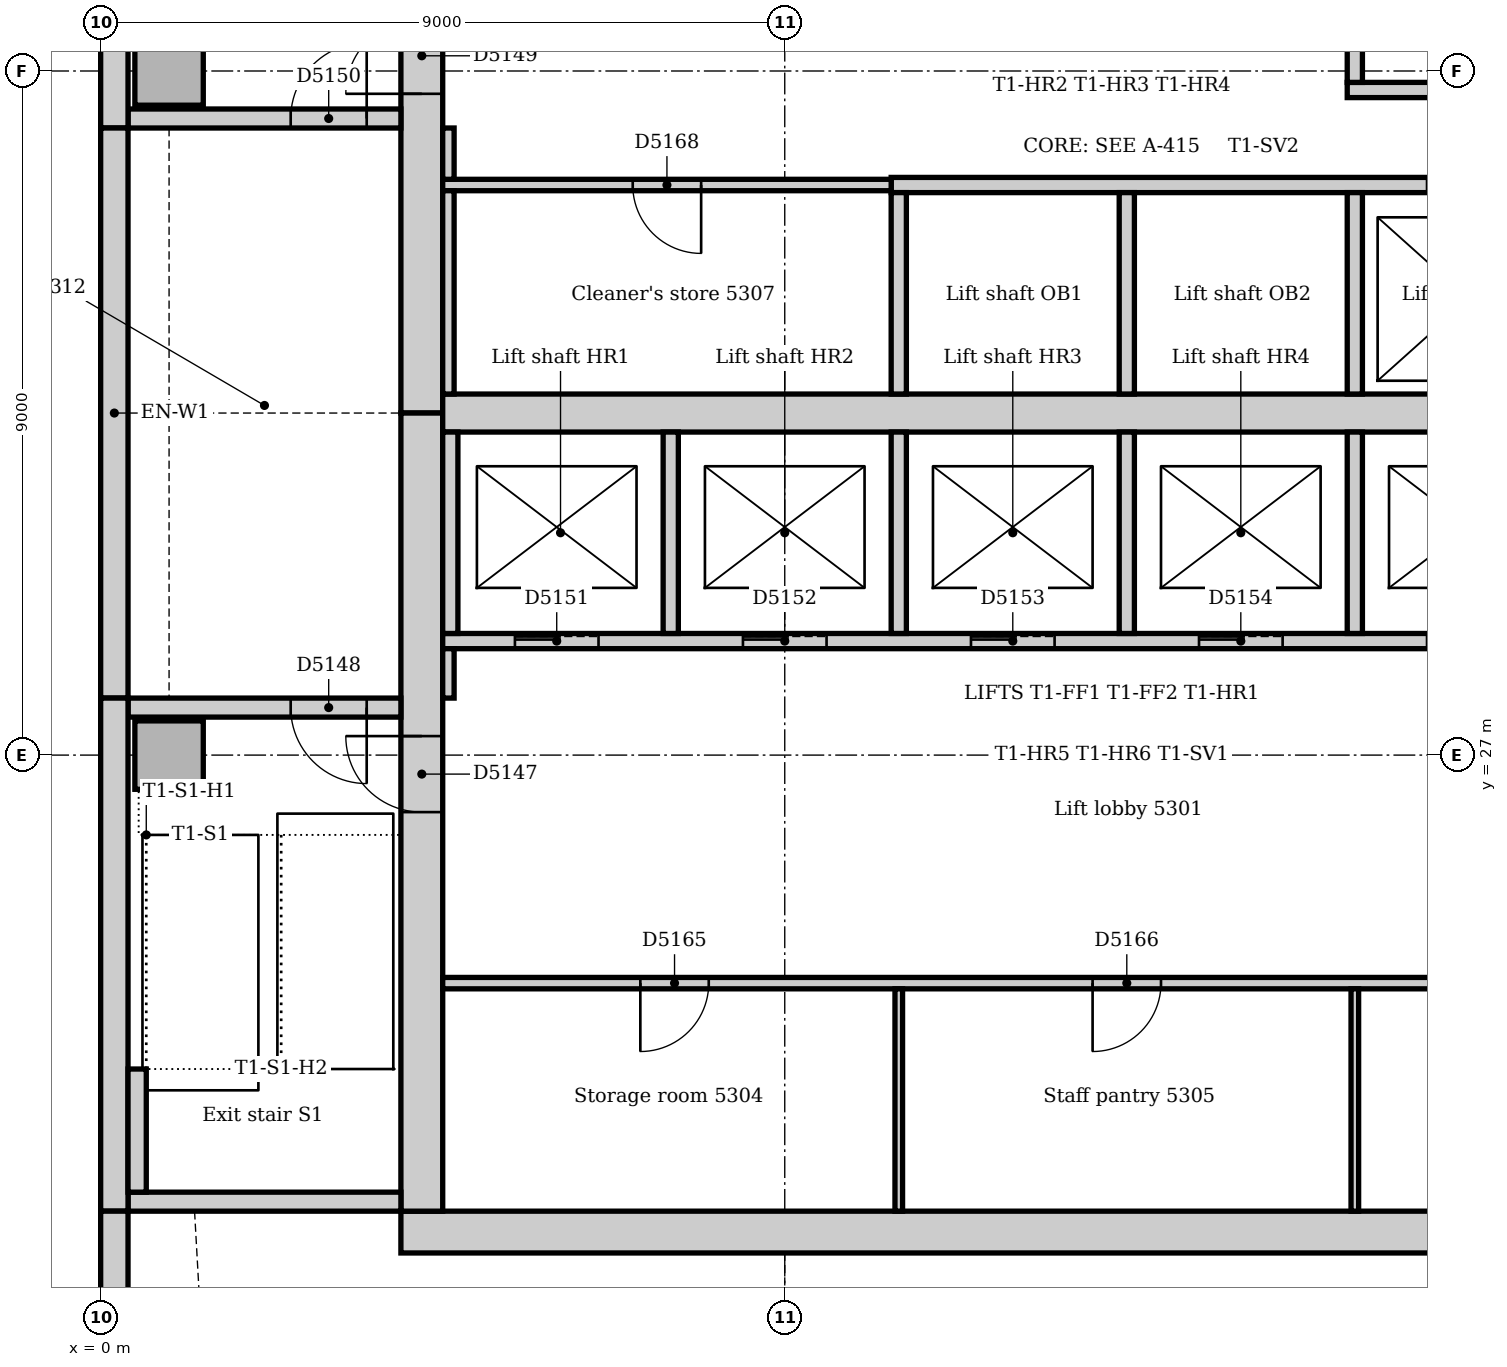
"""IFC4 building model, lengths in metres.
Left out: names, types, materials, properties, quantities, classifications, styles, units other than length and angle.
Written with IfcOpenShell. Run it as: python <this file> out.ifc"""

import sys

from ifc_helpers import new_model, si_unit, direction, frame, frame_2d, origin, origin_2d, place, context, subcontext, project, spatial, rectangle, extrude, element, fill, save


model = new_model("IFC4")
c1 = context("Model", 3, precision=1e-05, world=origin(), true_north=direction((0.0, 1.0)))
c2 = subcontext(c1, "Body", "Model", "MODEL_VIEW")
j1 = project(units=[si_unit("LENGTHUNIT", "METRE"), si_unit("PLANEANGLEUNIT", "RADIAN")], contexts=[c1])
p1 = place(None, origin())
s1 = spatial("IfcSite", under=j1, at=p1, CompositionType="ELEMENT")
p2 = place(p1, origin())
s2 = spatial("IfcBuilding", under=s1, at=p2, CompositionType="ELEMENT")
p3 = place(p2, frame((0.0, 0.0, 222.0)))
s3 = spatial("IfcBuildingStorey", under=s2, at=p3, CompositionType="ELEMENT", Elevation=222.0)
p4 = place(p3, frame((3.95, 20.725, 0.0), z_axis=(0.0, 0.0, 1.0), x_axis=(1.0, 0.0, 0.0)))
e1 = element("IfcWall", 1, at=p4, inside=s3, PredefinedType="SOLIDWALL", context=c2, shape_type="SweptSolid", body=[
    extrude(rectangle(XDim=19.1, YDim=0.55, at=frame_2d((9.55, 0.0))), origin(), (0.0, 0.0, 1.0), 4.0),
])
p5 = place(p3, frame((4.225, 42.0, 0.0), z_axis=(0.0, 0.0, 1.0), x_axis=(0.0, -1.0, 0.0)))
e2 = element("IfcWall", 2, at=p5, inside=s3, PredefinedType="SOLIDWALL", context=c2, shape_type="SweptSolid", body=[
    extrude(rectangle(XDim=10.5, YDim=0.55, at=frame_2d((5.25, 0.0))), origin(), (0.0, 0.0, 1.0), 4.0),
])
p6 = place(p5, frame((5.3, 0.0, 0.0)))
e3 = element("IfcOpeningElement", 3, at=p6, cuts=e2, PredefinedType="OPENING", context=c2, shape_type="SweptSolid", body=[
    extrude(rectangle(XDim=1.0, YDim=2.1, at=frame_2d((0.5, 1.05))), frame((0.0, 0.285, 0.0), z_axis=(0.0, -1.0, 0.0), x_axis=(1.0, 0.0, 0.0)), (0.0, 0.0, 1.0), 0.57),
])
p7 = place(p3, frame((4.225, 31.5, 0.0), z_axis=(0.0, 0.0, 1.0), x_axis=(0.0, -1.0, 0.0)))
e4 = element("IfcWall", 4, at=p7, inside=s3, PredefinedType="SOLIDWALL", context=c2, shape_type="SweptSolid", body=[
    extrude(rectangle(XDim=10.5, YDim=0.55, at=frame_2d((5.25, 0.0))), origin(), (0.0, 0.0, 1.0), 4.0),
])
p8 = place(p7, frame((4.25, 0.0, 0.0)))
e5 = element("IfcOpeningElement", 5, at=p8, cuts=e4, PredefinedType="OPENING", context=c2, shape_type="SweptSolid", body=[
    extrude(rectangle(XDim=1.0, YDim=2.1, at=frame_2d((0.5, 1.05))), frame((0.0, 0.285, 0.0), z_axis=(0.0, -1.0, 0.0), x_axis=(1.0, 0.0, 0.0)), (0.0, 0.0, 1.0), 0.57),
])
p9 = place(p3, frame((4.5, 31.5, 0.0), z_axis=(0.0, 0.0, 1.0), x_axis=(1.0, 0.0, 0.0)))
e6 = element("IfcWall", 6, at=p9, inside=s3, PredefinedType="SOLIDWALL", context=c2, shape_type="SweptSolid", body=[
    extrude(rectangle(XDim=18.0, YDim=0.5, at=frame_2d((9.0, 0.0))), origin(), (0.0, 0.0, 1.0), 4.0),
])
p10 = place(p3, frame((0.36, 21.125, 0.0), z_axis=(0.0, 0.0, 1.0), x_axis=(1.0, 0.0, 0.0)))
e7 = element("IfcWall", 7, at=p10, inside=s3, PredefinedType="SOLIDWALL", context=c2, shape_type="SweptSolid", body=[
    extrude(rectangle(XDim=3.59, YDim=0.25, at=frame_2d((1.795, 0.0))), origin(), (0.0, 0.0, 1.0), 4.0),
])
p11 = place(p3, frame((3.95, 27.625, 0.0), z_axis=(0.0, 0.0, 1.0), x_axis=(-1.0, 0.0, 0.0)))
e8 = element("IfcWall", 8, at=p11, inside=s3, PredefinedType="SOLIDWALL", context=c2, shape_type="SweptSolid", body=[
    extrude(rectangle(XDim=3.59, YDim=0.25, at=frame_2d((1.795, 0.0))), origin(), (0.0, 0.0, 1.0), 4.0),
])
p12 = place(p11, frame((0.45, 0.0, 0.0)))
e9 = element("IfcOpeningElement", 9, at=p12, cuts=e8, PredefinedType="OPENING", context=c2, shape_type="SweptSolid", body=[
    extrude(rectangle(XDim=1.0, YDim=2.1, at=frame_2d((0.5, 1.05))), frame((0.0, 0.135, 0.0), z_axis=(0.0, -1.0, 0.0), x_axis=(1.0, 0.0, 0.0)), (0.0, 0.0, 1.0), 0.27),
])
p13 = place(p3, frame((0.36, 35.375, 0.0), z_axis=(0.0, 0.0, 1.0), x_axis=(1.0, 0.0, 0.0)))
e10 = element("IfcWall", 10, at=p13, inside=s3, PredefinedType="SOLIDWALL", context=c2, shape_type="SweptSolid", body=[
    extrude(rectangle(XDim=3.59, YDim=0.25, at=frame_2d((1.795, 0.0))), origin(), (0.0, 0.0, 1.0), 4.0),
])
p14 = place(p13, frame((2.14, 0.0, 0.0)))
e11 = element("IfcOpeningElement", 11, at=p14, cuts=e10, PredefinedType="OPENING", context=c2, shape_type="SweptSolid", body=[
    extrude(rectangle(XDim=1.0, YDim=2.1, at=frame_2d((0.5, 1.05))), frame((0.0, 0.135, 0.0), z_axis=(0.0, -1.0, 0.0), x_axis=(1.0, 0.0, 0.0)), (0.0, 0.0, 1.0), 0.27),
])
for number, where, z_axis, x_axis in (
    (12, (0.9, 27.0, 0.0), (0.0, 0.0, 1.0), (1.0, 0.0, 0.0)),
    (13, (0.9, 36.0, 0.0), (0.0, 0.0, 1.0), (1.0, 0.0, 0.0)),
):
    element("IfcColumn", number, at=place(p3, frame(where, z_axis=z_axis, x_axis=x_axis)), inside=s3, PredefinedType="COLUMN", context=c2, shape_type="SweptSolid", body=[
        extrude(rectangle(XDim=0.9, YDim=0.9, at=origin_2d()), origin(), (0.0, 0.0, 1.0), 4.0),
    ])
p15 = place(p3, frame((0.18, 42.0, 0.0), z_axis=(0.0, 0.0, 1.0), x_axis=(0.0, -1.0, 0.0)))
e14 = element("IfcWall", 14, at=p15, inside=s3, PredefinedType="STANDARD", context=c2, shape_type="SweptSolid", body=[
    extrude(rectangle(XDim=6.75, YDim=0.36, at=frame_2d((3.375, 0.0))), origin(), (0.0, 0.0, 1.0), 3.85),
])
p16 = place(p3, frame((0.18, 35.25, 0.0), z_axis=(0.0, 0.0, 1.0), x_axis=(0.0, -1.0, 0.0)))
e15 = element("IfcWall", 15, at=p16, inside=s3, PredefinedType="STANDARD", context=c2, shape_type="SweptSolid", body=[
    extrude(rectangle(XDim=7.5, YDim=0.36, at=frame_2d((3.75, 0.0))), origin(), (0.0, 0.0, 1.0), 3.85),
])
p17 = place(p3, frame((0.18, 27.75, 0.0), z_axis=(0.0, 0.0, 1.0), x_axis=(0.0, -1.0, 0.0)))
e16 = element("IfcWall", 16, at=p17, inside=s3, PredefinedType="STANDARD", context=c2, shape_type="SweptSolid", body=[
    extrude(rectangle(XDim=6.75, YDim=0.36, at=frame_2d((3.375, 0.0))), origin(), (0.0, 0.0, 1.0), 3.85),
])
p18 = place(p3, frame((0.18, 21.0, 0.0), z_axis=(0.0, 0.0, 1.0), x_axis=(0.0, -1.0, 0.0)))
e17 = element("IfcWall", 17, at=p18, inside=s3, PredefinedType="STANDARD", context=c2, shape_type="SweptSolid", body=[
    extrude(rectangle(XDim=3.257, YDim=0.36, at=frame_2d((1.629, 0.0))), origin(), (0.0, 0.0, 1.0), 3.85),
])
p19 = place(p3, frame((0.48, 21.25, 0.0), z_axis=(0.0, 0.0, 1.0), x_axis=(0.0, 1.0, 0.0)))
e18 = element("IfcWall", 18, at=p19, inside=s3, PredefinedType="STANDARD", context=c2, shape_type="SweptSolid", body=[
    extrude(rectangle(XDim=1.62, YDim=0.24, at=frame_2d((0.81, 0.0))), origin(), (0.0, 0.0, 1.0), 4.0),
])
p20 = place(p3, frame((16.4, 35.75, 0.0), z_axis=(0.0, 0.0, 1.0), x_axis=(1.0, 0.0, 0.0)))
e19 = element("IfcWall", 19, at=p20, inside=s3, PredefinedType="PARTITIONING", context=c2, shape_type="SweptSolid", body=[
    extrude(rectangle(XDim=6.1, YDim=0.2, at=frame_2d((3.05, 0.0))), origin(), (0.0, 0.0, 1.0), 3.85),
])
p21 = place(p3, frame((16.5, 35.85, 0.0), z_axis=(0.0, 0.0, 1.0), x_axis=(0.0, 1.0, 0.0)))
e20 = element("IfcWall", 20, at=p21, inside=s3, PredefinedType="PARTITIONING", context=c2, shape_type="SweptSolid", body=[
    extrude(rectangle(XDim=2.55, YDim=0.2, at=frame_2d((1.275, 0.0))), origin(), (0.0, 0.0, 1.0), 3.85),
])
p22 = place(p3, frame((4.5, 28.5, 0.0), z_axis=(0.0, 0.0, 1.0), x_axis=(1.0, 0.0, 0.0)))
e21 = element("IfcWall", 21, at=p22, inside=s3, PredefinedType="PARTITIONING", context=c2, shape_type="SweptSolid", body=[
    extrude(rectangle(XDim=18.0, YDim=0.2, at=frame_2d((9.0, 0.0))), origin(), (0.0, 0.0, 1.0), 3.85),
])
p23 = place(p22, frame((0.95, 0.0, 0.0)))
e22 = element("IfcOpeningElement", 22, at=p23, cuts=e21, PredefinedType="OPENING", context=c2, shape_type="SweptSolid", body=[
    extrude(rectangle(XDim=1.1, YDim=2.1, at=frame_2d((0.55, 1.05))), frame((0.0, 0.11, 0.0), z_axis=(0.0, -1.0, 0.0), x_axis=(1.0, 0.0, 0.0)), (0.0, 0.0, 1.0), 0.22),
])
p24 = place(p22, frame((3.95, 0.0, 0.0)))
e23 = element("IfcOpeningElement", 23, at=p24, cuts=e21, PredefinedType="OPENING", context=c2, shape_type="SweptSolid", body=[
    extrude(rectangle(XDim=1.1, YDim=2.1, at=frame_2d((0.55, 1.05))), frame((0.0, 0.11, 0.0), z_axis=(0.0, -1.0, 0.0), x_axis=(1.0, 0.0, 0.0)), (0.0, 0.0, 1.0), 0.22),
])
p25 = place(p22, frame((6.95, 0.0, 0.0)))
e24 = element("IfcOpeningElement", 24, at=p25, cuts=e21, PredefinedType="OPENING", context=c2, shape_type="SweptSolid", body=[
    extrude(rectangle(XDim=1.1, YDim=2.1, at=frame_2d((0.55, 1.05))), frame((0.0, 0.11, 0.0), z_axis=(0.0, -1.0, 0.0), x_axis=(1.0, 0.0, 0.0)), (0.0, 0.0, 1.0), 0.22),
])
p26 = place(p22, frame((9.95, 0.0, 0.0)))
e25 = element("IfcOpeningElement", 25, at=p26, cuts=e21, PredefinedType="OPENING", context=c2, shape_type="SweptSolid", body=[
    extrude(rectangle(XDim=1.1, YDim=2.1, at=frame_2d((0.55, 1.05))), frame((0.0, 0.11, 0.0), z_axis=(0.0, -1.0, 0.0), x_axis=(1.0, 0.0, 0.0)), (0.0, 0.0, 1.0), 0.22),
])
p27 = place(p22, frame((12.95, 0.0, 0.0)))
e26 = element("IfcOpeningElement", 26, at=p27, cuts=e21, PredefinedType="OPENING", context=c2, shape_type="SweptSolid", body=[
    extrude(rectangle(XDim=1.1, YDim=2.1, at=frame_2d((0.55, 1.05))), frame((0.0, 0.11, 0.0), z_axis=(0.0, -1.0, 0.0), x_axis=(1.0, 0.0, 0.0)), (0.0, 0.0, 1.0), 0.22),
])
p28 = place(p22, frame((15.95, 0.0, 0.0)))
e27 = element("IfcOpeningElement", 27, at=p28, cuts=e21, PredefinedType="OPENING", context=c2, shape_type="SweptSolid", body=[
    extrude(rectangle(XDim=1.1, YDim=2.1, at=frame_2d((0.55, 1.05))), frame((0.0, 0.11, 0.0), z_axis=(0.0, -1.0, 0.0), x_axis=(1.0, 0.0, 0.0)), (0.0, 0.0, 1.0), 0.22),
])
p29 = place(p3, frame((10.4, 34.5, 0.0), z_axis=(0.0, 0.0, 1.0), x_axis=(1.0, 0.0, 0.0)))
e28 = element("IfcWall", 28, at=p29, inside=s3, PredefinedType="PARTITIONING", context=c2, shape_type="SweptSolid", body=[
    extrude(rectangle(XDim=12.1, YDim=0.2, at=frame_2d((6.05, 0.0))), origin(), (0.0, 0.0, 1.0), 3.85),
])
p30 = place(p29, frame((7.05, 0.0, 0.0)))
e29 = element("IfcOpeningElement", 29, at=p30, cuts=e28, PredefinedType="OPENING", context=c2, shape_type="SweptSolid", body=[
    extrude(rectangle(XDim=1.1, YDim=2.1, at=frame_2d((0.55, 1.05))), frame((0.0, 0.11, 0.0), z_axis=(0.0, -1.0, 0.0), x_axis=(1.0, 0.0, 0.0)), (0.0, 0.0, 1.0), 0.22),
])
p31 = place(p29, frame((10.05, 0.0, 0.0)))
e30 = element("IfcOpeningElement", 30, at=p31, cuts=e28, PredefinedType="OPENING", context=c2, shape_type="SweptSolid", body=[
    extrude(rectangle(XDim=1.1, YDim=2.1, at=frame_2d((0.55, 1.05))), frame((0.0, 0.11, 0.0), z_axis=(0.0, -1.0, 0.0), x_axis=(1.0, 0.0, 0.0)), (0.0, 0.0, 1.0), 0.22),
])
for number, where, z_axis, x_axis in (
    (31, (10.5, 28.6, 0.0), (0.0, 0.0, 1.0), (0.0, 1.0, 0.0)),
    (32, (10.5, 31.75, 0.0), (0.0, 0.0, 1.0), (0.0, 1.0, 0.0)),
    (33, (13.5, 28.6, 0.0), (0.0, 0.0, 1.0), (0.0, 1.0, 0.0)),
    (34, (13.5, 31.75, 0.0), (0.0, 0.0, 1.0), (0.0, 1.0, 0.0)),
    (35, (16.5, 28.6, 0.0), (0.0, 0.0, 1.0), (0.0, 1.0, 0.0)),
    (36, (16.5, 31.75, 0.0), (0.0, 0.0, 1.0), (0.0, 1.0, 0.0)),
    (37, (4.6, 28.6, 0.0), (0.0, 0.0, 1.0), (0.0, 1.0, 0.0)),
    (38, (7.5, 28.6, 0.0), (0.0, 0.0, 1.0), (0.0, 1.0, 0.0)),
):
    element("IfcWall", number, at=place(p3, frame(where, z_axis=z_axis, x_axis=x_axis)), inside=s3, PredefinedType="PARTITIONING", context=c2, shape_type="SweptSolid", body=[
        extrude(rectangle(XDim=2.65, YDim=0.2, at=frame_2d((1.325, 0.0))), origin(), (0.0, 0.0, 1.0), 3.85),
    ])
p32 = place(p3, frame((4.5, 24.0, 0.0), z_axis=(0.0, 0.0, 1.0), x_axis=(1.0, 0.0, 0.0)))
e39 = element("IfcWall", 39, at=p32, inside=s3, PredefinedType="PARTITIONING", context=c2, shape_type="SweptSolid", body=[
    extrude(rectangle(XDim=18.0, YDim=0.15, at=frame_2d((9.0, 0.0))), origin(), (0.0, 0.0, 1.0), 3.85),
])
p33 = place(p32, frame((2.6, 0.0, 0.0)))
e40 = element("IfcOpeningElement", 40, at=p33, cuts=e39, PredefinedType="OPENING", context=c2, shape_type="SweptSolid", body=[
    extrude(rectangle(XDim=0.9, YDim=2.1, at=frame_2d((0.45, 1.05))), frame((0.0, 0.085, 0.0), z_axis=(0.0, -1.0, 0.0), x_axis=(1.0, 0.0, 0.0)), (0.0, 0.0, 1.0), 0.17),
])
p34 = place(p32, frame((8.55, 0.0, 0.0)))
e41 = element("IfcOpeningElement", 41, at=p34, cuts=e39, PredefinedType="OPENING", context=c2, shape_type="SweptSolid", body=[
    extrude(rectangle(XDim=0.9, YDim=2.1, at=frame_2d((0.45, 1.05))), frame((0.0, 0.085, 0.0), z_axis=(0.0, -1.0, 0.0), x_axis=(1.0, 0.0, 0.0)), (0.0, 0.0, 1.0), 0.17),
])
p35 = place(p32, frame((14.45, 0.0, 0.0)))
e42 = element("IfcOpeningElement", 42, at=p35, cuts=e39, PredefinedType="OPENING", context=c2, shape_type="SweptSolid", body=[
    extrude(rectangle(XDim=0.9, YDim=2.1, at=frame_2d((0.45, 1.05))), frame((0.0, 0.085, 0.0), z_axis=(0.0, -1.0, 0.0), x_axis=(1.0, 0.0, 0.0)), (0.0, 0.0, 1.0), 0.17),
])
p36 = place(p3, frame((4.5, 34.5, 0.0), z_axis=(0.0, 0.0, 1.0), x_axis=(1.0, 0.0, 0.0)))
e43 = element("IfcWall", 43, at=p36, inside=s3, PredefinedType="PARTITIONING", context=c2, shape_type="SweptSolid", body=[
    extrude(rectangle(XDim=5.9, YDim=0.15, at=frame_2d((2.95, 0.0))), origin(), (0.0, 0.0, 1.0), 3.85),
])
p37 = place(p36, frame((2.5, 0.0, 0.0)))
e44 = element("IfcOpeningElement", 44, at=p37, cuts=e43, PredefinedType="OPENING", context=c2, shape_type="SweptSolid", body=[
    extrude(rectangle(XDim=0.9, YDim=2.1, at=frame_2d((0.45, 1.05))), frame((0.0, 0.085, 0.0), z_axis=(0.0, -1.0, 0.0), x_axis=(1.0, 0.0, 0.0)), (0.0, 0.0, 1.0), 0.17),
])
p38 = place(p3, frame((4.575, 34.575, 0.0), z_axis=(0.0, 0.0, 1.0), x_axis=(0.0, 1.0, 0.0)))
e45 = element("IfcWall", 45, at=p38, inside=s3, PredefinedType="PARTITIONING", context=c2, shape_type="SweptSolid", body=[
    extrude(rectangle(XDim=0.675, YDim=0.15, at=frame_2d((0.338, 0.0))), origin(), (0.0, 0.0, 1.0), 3.85),
])
p39 = place(p3, frame((4.575, 31.75, 0.0), z_axis=(0.0, 0.0, 1.0), x_axis=(0.0, 1.0, 0.0)))
e46 = element("IfcWall", 46, at=p39, inside=s3, PredefinedType="PARTITIONING", context=c2, shape_type="SweptSolid", body=[
    extrude(rectangle(XDim=2.675, YDim=0.15, at=frame_2d((1.337, 0.0))), origin(), (0.0, 0.0, 1.0), 3.85),
])
p40 = place(p3, frame((4.575, 27.75, 0.0), z_axis=(0.0, 0.0, 1.0), x_axis=(0.0, 1.0, 0.0)))
e47 = element("IfcWall", 47, at=p40, inside=s3, PredefinedType="PARTITIONING", context=c2, shape_type="SweptSolid", body=[
    extrude(rectangle(XDim=0.65, YDim=0.15, at=frame_2d((0.325, 0.0))), origin(), (0.0, 0.0, 1.0), 3.85),
])
for number, where, z_axis, x_axis in (
    (48, (10.5, 21.0, 0.0), (0.0, 0.0, 1.0), (0.0, 1.0, 0.0)),
    (49, (16.5, 21.0, 0.0), (0.0, 0.0, 1.0), (0.0, 1.0, 0.0)),
):
    element("IfcWall", number, at=place(p3, frame(where, z_axis=z_axis, x_axis=x_axis)), inside=s3, PredefinedType="PARTITIONING", context=c2, shape_type="SweptSolid", body=[
        extrude(rectangle(XDim=2.925, YDim=0.1, at=frame_2d((1.462, 0.0))), origin(), (0.0, 0.0, 1.0), 3.85),
    ])
p41 = place(p8, frame((1.0, 0.0, 0.0), z_axis=(0.0, 0.0, 1.0), x_axis=(-1.0, 0.0, 0.0)))
e50 = element("IfcDoor", 50, at=p41, inside=s3, OperationType="SINGLE_SWING_RIGHT", PredefinedType="DOOR", context=c2, shape_type="SweptSolid", body=[
    extrude(rectangle(XDim=1.0, YDim=2.1, at=frame_2d((0.5, 1.05))), frame((0.0, 0.025, 0.0), z_axis=(0.0, -1.0, 0.0), x_axis=(1.0, 0.0, 0.0)), (0.0, 0.0, 1.0), 0.05),
])
fill(e5, e50)
p42 = place(p12, origin())
e51 = element("IfcDoor", 51, at=p42, inside=s3, OperationType="SINGLE_SWING_LEFT", PredefinedType="DOOR", context=c2, shape_type="SweptSolid", body=[
    extrude(rectangle(XDim=1.0, YDim=2.1, at=frame_2d((0.5, 1.05))), frame((0.0, 0.025, 0.0), z_axis=(0.0, -1.0, 0.0), x_axis=(1.0, 0.0, 0.0)), (0.0, 0.0, 1.0), 0.05),
])
fill(e9, e51)
p43 = place(p6, frame((1.0, 0.0, 0.0), z_axis=(0.0, 0.0, 1.0), x_axis=(-1.0, 0.0, 0.0)))
e52 = element("IfcDoor", 52, at=p43, inside=s3, OperationType="SINGLE_SWING_LEFT", PredefinedType="DOOR", context=c2, shape_type="SweptSolid", body=[
    extrude(rectangle(XDim=1.0, YDim=2.1, at=frame_2d((0.5, 1.05))), frame((0.0, 0.025, 0.0), z_axis=(0.0, -1.0, 0.0), x_axis=(1.0, 0.0, 0.0)), (0.0, 0.0, 1.0), 0.05),
])
fill(e3, e52)
p44 = place(p14, origin())
e53 = element("IfcDoor", 53, at=p44, inside=s3, OperationType="SINGLE_SWING_RIGHT", PredefinedType="DOOR", context=c2, shape_type="SweptSolid", body=[
    extrude(rectangle(XDim=1.0, YDim=2.1, at=frame_2d((0.5, 1.05))), frame((0.0, 0.025, 0.0), z_axis=(0.0, -1.0, 0.0), x_axis=(1.0, 0.0, 0.0)), (0.0, 0.0, 1.0), 0.05),
])
fill(e11, e53)
p45 = place(p23, origin())
e54 = element("IfcDoor", 54, at=p45, inside=s3, OperationType="SLIDING_TO_LEFT", PredefinedType="DOOR", context=c2, shape_type="SweptSolid", body=[
    extrude(rectangle(XDim=1.1, YDim=2.1, at=frame_2d((0.55, 1.05))), frame((0.0, 0.025, 0.0), z_axis=(0.0, -1.0, 0.0), x_axis=(1.0, 0.0, 0.0)), (0.0, 0.0, 1.0), 0.05),
])
fill(e22, e54)
p46 = place(p24, origin())
e55 = element("IfcDoor", 55, at=p46, inside=s3, OperationType="SLIDING_TO_LEFT", PredefinedType="DOOR", context=c2, shape_type="SweptSolid", body=[
    extrude(rectangle(XDim=1.1, YDim=2.1, at=frame_2d((0.55, 1.05))), frame((0.0, 0.025, 0.0), z_axis=(0.0, -1.0, 0.0), x_axis=(1.0, 0.0, 0.0)), (0.0, 0.0, 1.0), 0.05),
])
fill(e23, e55)
p47 = place(p25, origin())
e56 = element("IfcDoor", 56, at=p47, inside=s3, OperationType="SLIDING_TO_LEFT", PredefinedType="DOOR", context=c2, shape_type="SweptSolid", body=[
    extrude(rectangle(XDim=1.1, YDim=2.1, at=frame_2d((0.55, 1.05))), frame((0.0, 0.025, 0.0), z_axis=(0.0, -1.0, 0.0), x_axis=(1.0, 0.0, 0.0)), (0.0, 0.0, 1.0), 0.05),
])
fill(e24, e56)
p48 = place(p26, origin())
e57 = element("IfcDoor", 57, at=p48, inside=s3, OperationType="SLIDING_TO_LEFT", PredefinedType="DOOR", context=c2, shape_type="SweptSolid", body=[
    extrude(rectangle(XDim=1.1, YDim=2.1, at=frame_2d((0.55, 1.05))), frame((0.0, 0.025, 0.0), z_axis=(0.0, -1.0, 0.0), x_axis=(1.0, 0.0, 0.0)), (0.0, 0.0, 1.0), 0.05),
])
fill(e25, e57)
p49 = place(p33, frame((0.9, 0.0, 0.0), z_axis=(0.0, 0.0, 1.0), x_axis=(-1.0, 0.0, 0.0)))
e58 = element("IfcDoor", 58, at=p49, inside=s3, OperationType="SINGLE_SWING_RIGHT", PredefinedType="DOOR", context=c2, shape_type="SweptSolid", body=[
    extrude(rectangle(XDim=0.9, YDim=2.1, at=frame_2d((0.45, 1.05))), frame((0.0, 0.025, 0.0), z_axis=(0.0, -1.0, 0.0), x_axis=(1.0, 0.0, 0.0)), (0.0, 0.0, 1.0), 0.05),
])
fill(e40, e58)
p50 = place(p34, frame((0.9, 0.0, 0.0), z_axis=(0.0, 0.0, 1.0), x_axis=(-1.0, 0.0, 0.0)))
e59 = element("IfcDoor", 59, at=p50, inside=s3, OperationType="SINGLE_SWING_RIGHT", PredefinedType="DOOR", context=c2, shape_type="SweptSolid", body=[
    extrude(rectangle(XDim=0.9, YDim=2.1, at=frame_2d((0.45, 1.05))), frame((0.0, 0.025, 0.0), z_axis=(0.0, -1.0, 0.0), x_axis=(1.0, 0.0, 0.0)), (0.0, 0.0, 1.0), 0.05),
])
fill(e41, e59)
p51 = place(p37, frame((0.9, 0.0, 0.0), z_axis=(0.0, 0.0, 1.0), x_axis=(-1.0, 0.0, 0.0)))
e60 = element("IfcDoor", 60, at=p51, inside=s3, OperationType="SINGLE_SWING_LEFT", PredefinedType="DOOR", context=c2, shape_type="SweptSolid", body=[
    extrude(rectangle(XDim=0.9, YDim=2.1, at=frame_2d((0.45, 1.05))), frame((0.0, 0.025, 0.0), z_axis=(0.0, -1.0, 0.0), x_axis=(1.0, 0.0, 0.0)), (0.0, 0.0, 1.0), 0.05),
])
fill(e44, e60)
save(model, sys.argv[1])
